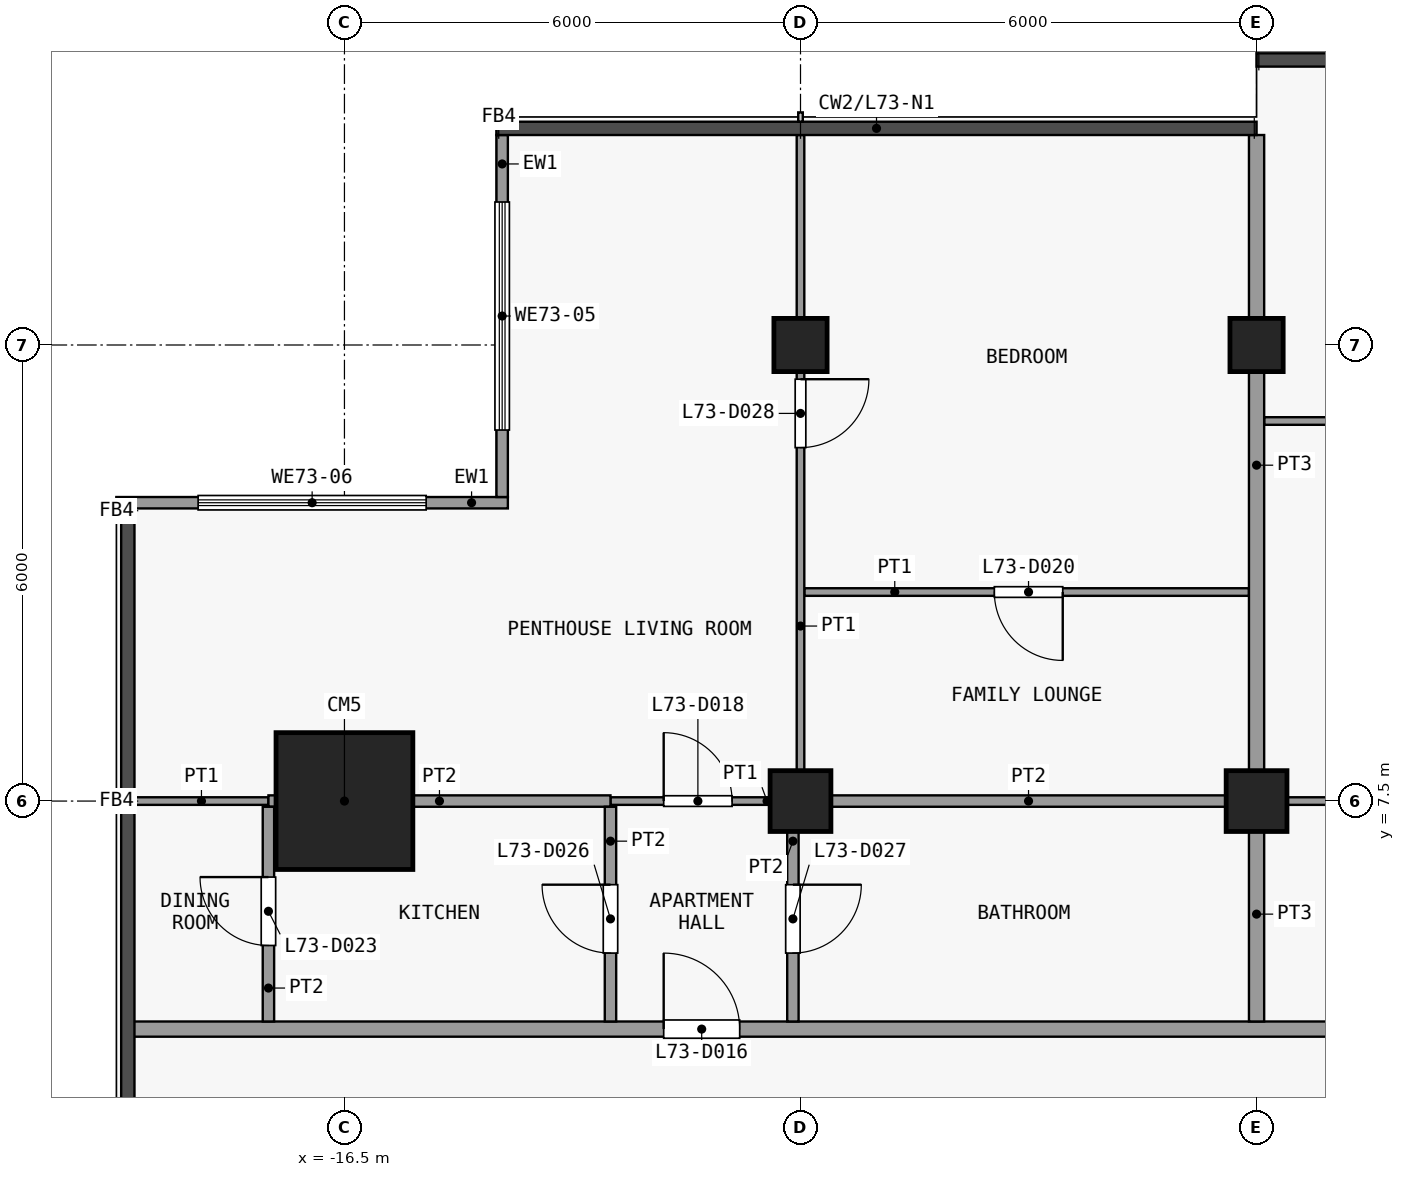
"""IFC4 building model, lengths in metres.
Left out: names, types, materials, properties, quantities, classifications, styles, units other than length and angle.
Written with IfcOpenShell. Run it as: python <this file> out.ifc"""

import sys

from ifc_helpers import new_model, si_unit, direction, frame, frame_2d, origin, origin_2d, place, context, subcontext, project, spatial, rectangle, extrude, element, fill, save


model = new_model("IFC4")
c1 = context("Model", 3, precision=1e-05, world=origin(), true_north=direction((0.0, 1.0)))
c2 = subcontext(c1, "Body", "Model", "MODEL_VIEW")
j1 = project(units=[si_unit("LENGTHUNIT", "METRE"), si_unit("PLANEANGLEUNIT", "RADIAN")], contexts=[c1])
p1 = place(None, origin())
s1 = spatial("IfcSite", under=j1, at=p1, CompositionType="ELEMENT")
p2 = place(p1, origin())
s2 = spatial("IfcBuilding", under=s1, at=p2, CompositionType="ELEMENT")
p3 = place(p2, frame((0.0, 0.0, 287.9)))
s3 = spatial("IfcBuildingStorey", under=s2, at=p3, CompositionType="ELEMENT", Elevation=287.9)
p4 = place(p3, frame((-16.5, 7.5, 0.0), z_axis=(0.0, 0.0, 1.0), x_axis=(1.0, 0.0, 0.0)))
e1 = element("IfcColumn", 1, at=p4, inside=s3, PredefinedType="COLUMN", context=c2, shape_type="SweptSolid", body=[
    extrude(rectangle(XDim=1.8, YDim=1.8, at=origin_2d()), origin(), (0.0, 0.0, 1.0), 3.6),
])
p5 = place(p3, frame((-10.5, 7.5, 0.0), z_axis=(0.0, 0.0, 1.0), x_axis=(1.0, 0.0, 0.0)))
e2 = element("IfcColumn", 2, at=p5, inside=s3, PredefinedType="COLUMN", context=c2, shape_type="SweptSolid", body=[
    extrude(rectangle(XDim=0.8, YDim=0.8, at=origin_2d()), origin(), (0.0, 0.0, 1.0), 3.6),
])
p6 = place(p3, frame((-10.5, 13.5, 0.0), z_axis=(0.0, 0.0, 1.0), x_axis=(1.0, 0.0, 0.0)))
e3 = element("IfcColumn", 3, at=p6, inside=s3, PredefinedType="COLUMN", context=c2, shape_type="SweptSolid", body=[
    extrude(rectangle(XDim=0.7, YDim=0.7, at=origin_2d()), origin(), (0.0, 0.0, 1.0), 3.6),
])
p7 = place(p3, frame((-4.5, 7.5, 0.0), z_axis=(0.0, 0.0, 1.0), x_axis=(1.0, 0.0, 0.0)))
e4 = element("IfcColumn", 4, at=p7, inside=s3, PredefinedType="COLUMN", context=c2, shape_type="SweptSolid", body=[
    extrude(rectangle(XDim=0.8, YDim=0.8, at=origin_2d()), origin(), (0.0, 0.0, 1.0), 3.6),
])
p8 = place(p3, frame((-4.5, 13.5, 0.0), z_axis=(0.0, 0.0, 1.0), x_axis=(1.0, 0.0, 0.0)))
e5 = element("IfcColumn", 5, at=p8, inside=s3, PredefinedType="COLUMN", context=c2, shape_type="SweptSolid", body=[
    extrude(rectangle(XDim=0.7, YDim=0.7, at=origin_2d()), origin(), (0.0, 0.0, 1.0), 3.6),
])
p9 = place(p3, frame((-14.425, 11.5, 0.0), z_axis=(0.0, 0.0, 1.0), x_axis=(0.0, 1.0, 0.0)))
e6 = element("IfcWall", 6, at=p9, inside=s3, PredefinedType="SOLIDWALL", context=c2, shape_type="SweptSolid", body=[
    extrude(rectangle(XDim=4.762, YDim=0.15, at=frame_2d((2.381, 0.0))), origin(), (0.0, 0.0, 1.0), 3.3),
])
p10 = place(p9, frame((0.881, 0.0, 0.9)))
e7 = element("IfcOpeningElement", 7, at=p10, cuts=e6, PredefinedType="OPENING", context=c2, shape_type="SweptSolid", body=[
    extrude(rectangle(XDim=3.0, YDim=2.4, at=frame_2d((1.5, 1.2))), frame((0.0, 0.085, 0.0), z_axis=(0.0, -1.0, 0.0), x_axis=(1.0, 0.0, 0.0)), (0.0, 0.0, 1.0), 0.17),
])
p11 = place(p3, frame((-19.5, 11.425, 0.0), z_axis=(0.0, 0.0, 1.0), x_axis=(1.0, 0.0, 0.0)))
e8 = element("IfcWall", 8, at=p11, inside=s3, PredefinedType="SOLIDWALL", context=c2, shape_type="SweptSolid", body=[
    extrude(rectangle(XDim=5.15, YDim=0.15, at=frame_2d((2.575, 0.0))), origin(), (0.0, 0.0, 1.0), 3.3),
])
p12 = place(p11, frame((1.075, 0.0, 0.9)))
e9 = element("IfcOpeningElement", 9, at=p12, cuts=e8, PredefinedType="OPENING", context=c2, shape_type="SweptSolid", body=[
    extrude(rectangle(XDim=3.0, YDim=2.4, at=frame_2d((1.5, 1.2))), frame((0.0, 0.085, 0.0), z_axis=(0.0, -1.0, 0.0), x_axis=(1.0, 0.0, 0.0)), (0.0, 0.0, 1.0), 0.17),
])
p13 = place(p3, frame((-19.35, 4.5, 0.0), z_axis=(0.0, 0.0, 1.0), x_axis=(1.0, 0.0, 0.0)))
e10 = element("IfcWall", 10, at=p13, inside=s3, PredefinedType="PARTITIONING", context=c2, shape_type="SweptSolid", body=[
    extrude(rectangle(XDim=39.6, YDim=0.2, at=frame_2d((19.8, 0.0))), origin(), (0.0, 0.0, 1.0), 3.3),
])
p14 = place(p13, frame((7.05, 0.0, 0.0)))
e11 = element("IfcOpeningElement", 11, at=p14, cuts=e10, PredefinedType="OPENING", context=c2, shape_type="SweptSolid", body=[
    extrude(rectangle(XDim=1.0, YDim=2.1, at=frame_2d((0.5, 1.05))), frame((0.0, 0.11, 0.0), z_axis=(0.0, -1.0, 0.0), x_axis=(1.0, 0.0, 0.0)), (0.0, 0.0, 1.0), 0.22),
])
p15 = place(p13, frame((24.55, 0.0, 0.0)))
e12 = element("IfcOpeningElement", 12, at=p15, cuts=e10, PredefinedType="OPENING", context=c2, shape_type="SweptSolid", body=[
    extrude(rectangle(XDim=1.0, YDim=2.1, at=frame_2d((0.5, 1.05))), frame((0.0, 0.11, 0.0), z_axis=(0.0, -1.0, 0.0), x_axis=(1.0, 0.0, 0.0)), (0.0, 0.0, 1.0), 0.22),
])
p16 = place(p3, frame((-19.262, 7.5, 0.0), z_axis=(0.0, 0.0, 1.0), x_axis=(1.0, 0.0, 0.0)))
e13 = element("IfcWall", 13, at=p16, inside=s3, PredefinedType="PARTITIONING", context=c2, shape_type="SweptSolid", body=[
    extrude(rectangle(XDim=1.762, YDim=0.1, at=frame_2d((0.881, 0.0))), origin(), (0.0, 0.0, 1.0), 3.3),
])
p17 = place(p3, frame((-13.0, 7.5, 0.0), z_axis=(0.0, 0.0, 1.0), x_axis=(1.0, 0.0, 0.0)))
e14 = element("IfcWall", 14, at=p17, inside=s3, PredefinedType="PARTITIONING", context=c2, shape_type="SweptSolid", body=[
    extrude(rectangle(XDim=2.4, YDim=0.1, at=frame_2d((1.2, 0.0))), origin(), (0.0, 0.0, 1.0), 3.3),
])
p18 = place(p17, frame((0.7, 0.0, 0.0)))
e15 = element("IfcOpeningElement", 15, at=p18, cuts=e14, PredefinedType="OPENING", context=c2, shape_type="SweptSolid", body=[
    extrude(rectangle(XDim=0.9, YDim=2.1, at=frame_2d((0.45, 1.05))), frame((0.0, 0.06, 0.0), z_axis=(0.0, -1.0, 0.0), x_axis=(1.0, 0.0, 0.0)), (0.0, 0.0, 1.0), 0.12),
])
p19 = place(p3, frame((-4.5, 7.5, 0.0), z_axis=(0.0, 0.0, 1.0), x_axis=(1.0, 0.0, 0.0)))
e16 = element("IfcWall", 16, at=p19, inside=s3, PredefinedType="PARTITIONING", context=c2, shape_type="SweptSolid", body=[
    extrude(rectangle(XDim=4.5, YDim=0.1, at=frame_2d((2.25, 0.0))), origin(), (0.0, 0.0, 1.0), 3.3),
])
p20 = place(p3, frame((-17.5, 7.5, 0.0), z_axis=(0.0, 0.0, 1.0), x_axis=(1.0, 0.0, 0.0)))
e17 = element("IfcWall", 17, at=p20, inside=s3, PredefinedType="PARTITIONING", context=c2, shape_type="SweptSolid", body=[
    extrude(rectangle(XDim=4.5, YDim=0.15, at=frame_2d((2.25, 0.0))), origin(), (0.0, 0.0, 1.0), 3.3),
])
p21 = place(p3, frame((-10.5, 7.5, 0.0), z_axis=(0.0, 0.0, 1.0), x_axis=(1.0, 0.0, 0.0)))
e18 = element("IfcWall", 18, at=p21, inside=s3, PredefinedType="PARTITIONING", context=c2, shape_type="SweptSolid", body=[
    extrude(rectangle(XDim=6.0, YDim=0.15, at=frame_2d((3.0, 0.0))), origin(), (0.0, 0.0, 1.0), 3.3),
])
p22 = place(p3, frame((-10.45, 10.25, 0.0), z_axis=(0.0, 0.0, 1.0), x_axis=(1.0, 0.0, 0.0)))
e19 = element("IfcWall", 19, at=p22, inside=s3, PredefinedType="PARTITIONING", context=c2, shape_type="SweptSolid", body=[
    extrude(rectangle(XDim=5.85, YDim=0.1, at=frame_2d((2.925, 0.0))), origin(), (0.0, 0.0, 1.0), 3.3),
])
p23 = place(p22, frame((2.5, 0.0, 0.0)))
e20 = element("IfcOpeningElement", 20, at=p23, cuts=e19, PredefinedType="OPENING", context=c2, shape_type="SweptSolid", body=[
    extrude(rectangle(XDim=0.9, YDim=2.1, at=frame_2d((0.45, 1.05))), frame((0.0, 0.06, 0.0), z_axis=(0.0, -1.0, 0.0), x_axis=(1.0, 0.0, 0.0)), (0.0, 0.0, 1.0), 0.12),
])
p24 = place(p3, frame((-4.4, 12.5, 0.0), z_axis=(0.0, 0.0, 1.0), x_axis=(1.0, 0.0, 0.0)))
e21 = element("IfcWall", 21, at=p24, inside=s3, PredefinedType="PARTITIONING", context=c2, shape_type="SweptSolid", body=[
    extrude(rectangle(XDim=8.85, YDim=0.1, at=frame_2d((4.425, 0.0))), origin(), (0.0, 0.0, 1.0), 3.3),
])
p25 = place(p24, frame((4.0, 0.0, 0.0)))
e22 = element("IfcOpeningElement", 22, at=p25, cuts=e21, PredefinedType="OPENING", context=c2, shape_type="SweptSolid", body=[
    extrude(rectangle(XDim=0.9, YDim=2.1, at=frame_2d((0.45, 1.05))), frame((0.0, 0.06, 0.0), z_axis=(0.0, -1.0, 0.0), x_axis=(1.0, 0.0, 0.0)), (0.0, 0.0, 1.0), 0.12),
])
p26 = place(p3, frame((-17.5, 4.6, 0.0), z_axis=(0.0, 0.0, 1.0), x_axis=(0.0, 1.0, 0.0)))
e23 = element("IfcWall", 23, at=p26, inside=s3, PredefinedType="PARTITIONING", context=c2, shape_type="SweptSolid", body=[
    extrude(rectangle(XDim=2.825, YDim=0.15, at=frame_2d((1.413, 0.0))), origin(), (0.0, 0.0, 1.0), 3.3),
])
p27 = place(p26, frame((1.0, 0.0, 0.0)))
e24 = element("IfcOpeningElement", 24, at=p27, cuts=e23, PredefinedType="OPENING", context=c2, shape_type="SweptSolid", body=[
    extrude(rectangle(XDim=0.9, YDim=2.1, at=frame_2d((0.45, 1.05))), frame((0.0, 0.085, 0.0), z_axis=(0.0, -1.0, 0.0), x_axis=(1.0, 0.0, 0.0)), (0.0, 0.0, 1.0), 0.17),
])
p28 = place(p3, frame((-13.0, 4.6, 0.0), z_axis=(0.0, 0.0, 1.0), x_axis=(0.0, 1.0, 0.0)))
e25 = element("IfcWall", 25, at=p28, inside=s3, PredefinedType="PARTITIONING", context=c2, shape_type="SweptSolid", body=[
    extrude(rectangle(XDim=2.825, YDim=0.15, at=frame_2d((1.413, 0.0))), origin(), (0.0, 0.0, 1.0), 3.3),
])
p29 = place(p28, frame((0.9, 0.0, 0.0)))
e26 = element("IfcOpeningElement", 26, at=p29, cuts=e25, PredefinedType="OPENING", context=c2, shape_type="SweptSolid", body=[
    extrude(rectangle(XDim=0.9, YDim=2.1, at=frame_2d((0.45, 1.05))), frame((0.0, 0.085, 0.0), z_axis=(0.0, -1.0, 0.0), x_axis=(1.0, 0.0, 0.0)), (0.0, 0.0, 1.0), 0.17),
])
p30 = place(p3, frame((-10.6, 4.6, 0.0), z_axis=(0.0, 0.0, 1.0), x_axis=(0.0, 1.0, 0.0)))
e27 = element("IfcWall", 27, at=p30, inside=s3, PredefinedType="PARTITIONING", context=c2, shape_type="SweptSolid", body=[
    extrude(rectangle(XDim=2.825, YDim=0.15, at=frame_2d((1.413, 0.0))), origin(), (0.0, 0.0, 1.0), 3.3),
])
p31 = place(p30, frame((0.9, 0.0, 0.0)))
e28 = element("IfcOpeningElement", 28, at=p31, cuts=e27, PredefinedType="OPENING", context=c2, shape_type="SweptSolid", body=[
    extrude(rectangle(XDim=0.9, YDim=2.1, at=frame_2d((0.45, 1.05))), frame((0.0, 0.085, 0.0), z_axis=(0.0, -1.0, 0.0), x_axis=(1.0, 0.0, 0.0)), (0.0, 0.0, 1.0), 0.17),
])
p32 = place(p3, frame((-10.5, 7.575, 0.0), z_axis=(0.0, 0.0, 1.0), x_axis=(0.0, 1.0, 0.0)))
e29 = element("IfcWall", 29, at=p32, inside=s3, PredefinedType="PARTITIONING", context=c2, shape_type="SweptSolid", body=[
    extrude(rectangle(XDim=8.688, YDim=0.1, at=frame_2d((4.344, 0.0))), origin(), (0.0, 0.0, 1.0), 3.3),
])
p33 = place(p32, frame((4.575, 0.0, 0.0)))
e30 = element("IfcOpeningElement", 30, at=p33, cuts=e29, PredefinedType="OPENING", context=c2, shape_type="SweptSolid", body=[
    extrude(rectangle(XDim=0.9, YDim=2.1, at=frame_2d((0.45, 1.05))), frame((0.0, 0.06, 0.0), z_axis=(0.0, -1.0, 0.0), x_axis=(1.0, 0.0, 0.0)), (0.0, 0.0, 1.0), 0.12),
])
p34 = place(p3, frame((-4.5, 4.6, 0.0), z_axis=(0.0, 0.0, 1.0), x_axis=(0.0, 1.0, 0.0)))
e31 = element("IfcWall", 31, at=p34, inside=s3, PredefinedType="PARTITIONING", context=c2, shape_type="SweptSolid", body=[
    extrude(rectangle(XDim=2.825, YDim=0.2, at=frame_2d((1.413, 0.0))), origin(), (0.0, 0.0, 1.0), 3.3),
])
p35 = place(p3, frame((-4.5, 7.575, 0.0), z_axis=(0.0, 0.0, 1.0), x_axis=(0.0, 1.0, 0.0)))
e32 = element("IfcWall", 32, at=p35, inside=s3, PredefinedType="PARTITIONING", context=c2, shape_type="SweptSolid", body=[
    extrude(rectangle(XDim=8.688, YDim=0.2, at=frame_2d((4.344, 0.0))), origin(), (0.0, 0.0, 1.0), 3.3),
])
p36 = place(p10, origin())
e33 = element("IfcWindow", 33, at=p36, inside=s3, PartitioningType="SINGLE_PANEL", PredefinedType="WINDOW", context=c2, shape_type="SweptSolid", body=[
    extrude(rectangle(XDim=3.0, YDim=2.4, at=frame_2d((1.5, 1.2))), frame((0.0, 0.03, 0.0), z_axis=(0.0, -1.0, 0.0), x_axis=(1.0, 0.0, 0.0)), (0.0, 0.0, 1.0), 0.06),
])
fill(e7, e33)
p37 = place(p12, origin())
e34 = element("IfcWindow", 34, at=p37, inside=s3, PartitioningType="SINGLE_PANEL", PredefinedType="WINDOW", context=c2, shape_type="SweptSolid", body=[
    extrude(rectangle(XDim=3.0, YDim=2.4, at=frame_2d((1.5, 1.2))), frame((0.0, 0.03, 0.0), z_axis=(0.0, -1.0, 0.0), x_axis=(1.0, 0.0, 0.0)), (0.0, 0.0, 1.0), 0.06),
])
fill(e9, e34)
p38 = place(p14, origin())
e35 = element("IfcDoor", 35, at=p38, inside=s3, OperationType="SINGLE_SWING_RIGHT", PredefinedType="DOOR", context=c2, shape_type="SweptSolid", body=[
    extrude(rectangle(XDim=1.0, YDim=2.1, at=frame_2d((0.5, 1.05))), frame((0.0, 0.025, 0.0), z_axis=(0.0, -1.0, 0.0), x_axis=(1.0, 0.0, 0.0)), (0.0, 0.0, 1.0), 0.05),
])
fill(e11, e35)
p39 = place(p18, origin())
e36 = element("IfcDoor", 36, at=p39, inside=s3, OperationType="SINGLE_SWING_RIGHT", PredefinedType="DOOR", context=c2, shape_type="SweptSolid", body=[
    extrude(rectangle(XDim=0.9, YDim=2.1, at=frame_2d((0.45, 1.05))), frame((0.0, 0.025, 0.0), z_axis=(0.0, -1.0, 0.0), x_axis=(1.0, 0.0, 0.0)), (0.0, 0.0, 1.0), 0.05),
])
fill(e15, e36)
p40 = place(p23, origin())
e37 = element("IfcDoor", 37, at=p40, inside=s3, OperationType="SINGLE_SWING_RIGHT", PredefinedType="DOOR", context=c2, shape_type="SweptSolid", body=[
    extrude(rectangle(XDim=0.9, YDim=2.1, at=frame_2d((0.45, 1.05))), frame((0.0, 0.025, 0.0), z_axis=(0.0, -1.0, 0.0), x_axis=(1.0, 0.0, 0.0)), (0.0, 0.0, 1.0), 0.05),
])
fill(e20, e37)
p41 = place(p27, origin())
e38 = element("IfcDoor", 38, at=p41, inside=s3, OperationType="SINGLE_SWING_LEFT", PredefinedType="DOOR", context=c2, shape_type="SweptSolid", body=[
    extrude(rectangle(XDim=0.9, YDim=2.1, at=frame_2d((0.45, 1.05))), frame((0.0, 0.025, 0.0), z_axis=(0.0, -1.0, 0.0), x_axis=(1.0, 0.0, 0.0)), (0.0, 0.0, 1.0), 0.05),
])
fill(e24, e38)
p42 = place(p29, origin())
e39 = element("IfcDoor", 39, at=p42, inside=s3, OperationType="SINGLE_SWING_LEFT", PredefinedType="DOOR", context=c2, shape_type="SweptSolid", body=[
    extrude(rectangle(XDim=0.9, YDim=2.1, at=frame_2d((0.45, 1.05))), frame((0.0, 0.025, 0.0), z_axis=(0.0, -1.0, 0.0), x_axis=(1.0, 0.0, 0.0)), (0.0, 0.0, 1.0), 0.05),
])
fill(e26, e39)
p43 = place(p31, origin())
e40 = element("IfcDoor", 40, at=p43, inside=s3, OperationType="SINGLE_SWING_RIGHT", PredefinedType="DOOR", context=c2, shape_type="SweptSolid", body=[
    extrude(rectangle(XDim=0.9, YDim=2.1, at=frame_2d((0.45, 1.05))), frame((0.0, 0.025, 0.0), z_axis=(0.0, -1.0, 0.0), x_axis=(1.0, 0.0, 0.0)), (0.0, 0.0, 1.0), 0.05),
])
fill(e28, e40)
p44 = place(p33, origin())
e41 = element("IfcDoor", 41, at=p44, inside=s3, OperationType="SINGLE_SWING_RIGHT", PredefinedType="DOOR", context=c2, shape_type="SweptSolid", body=[
    extrude(rectangle(XDim=0.9, YDim=2.1, at=frame_2d((0.45, 1.05))), frame((0.0, 0.025, 0.0), z_axis=(0.0, -1.0, 0.0), x_axis=(1.0, 0.0, 0.0)), (0.0, 0.0, 1.0), 0.05),
])
fill(e30, e41)
save(model, sys.argv[1])
